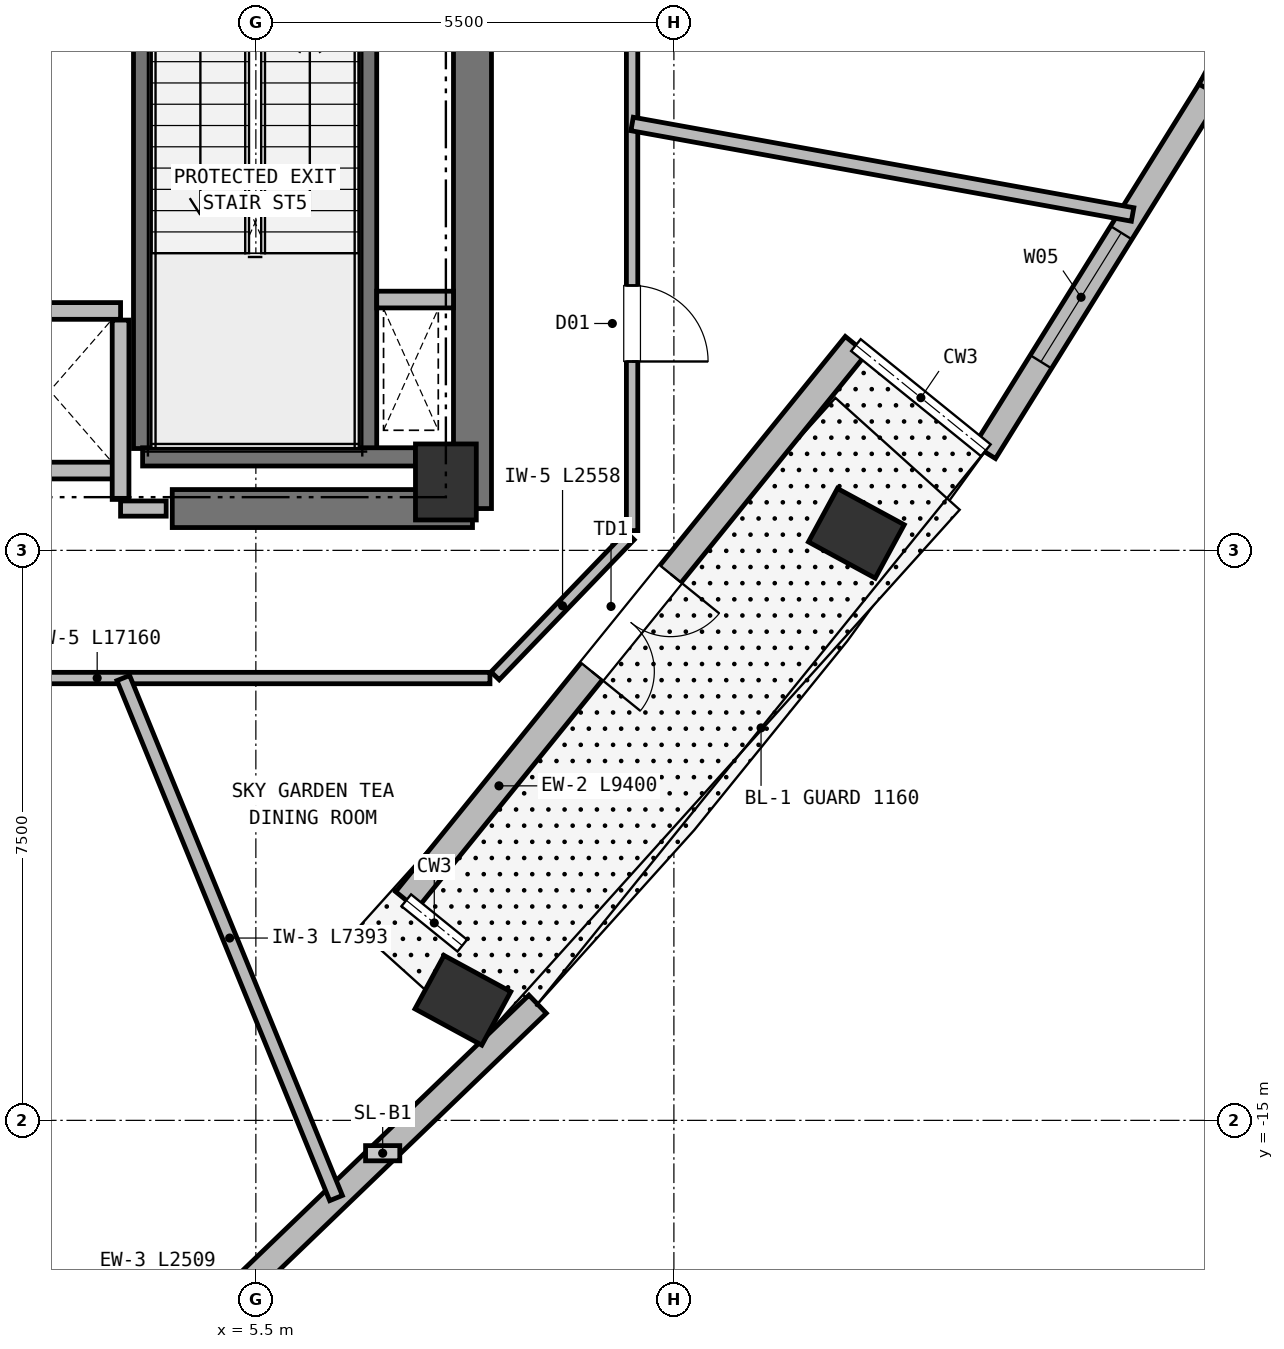
"""IFC4 building model, lengths in metres.
Left out: names, types, materials, properties, quantities, classifications, styles, units other than length and angle.
Written with IfcOpenShell. Run it as: python <this file> out.ifc"""

import sys

from ifc_helpers import new_model, si_unit, direction, frame, frame_2d, origin, origin_2d, place, context, subcontext, project, spatial, rectangle, extrude, element, fill, save


model = new_model("IFC4")
c1 = context("Model", 3, precision=1e-05, world=origin(), true_north=direction((0.0, 1.0)))
c2 = subcontext(c1, "Body", "Model", "MODEL_VIEW")
j1 = project(units=[si_unit("LENGTHUNIT", "METRE"), si_unit("PLANEANGLEUNIT", "RADIAN")], contexts=[c1])
p1 = place(None, origin())
s1 = spatial("IfcSite", under=j1, at=p1, CompositionType="ELEMENT")
p2 = place(p1, origin())
s2 = spatial("IfcBuilding", under=s1, at=p2, CompositionType="ELEMENT")
p3 = place(p2, frame((0.0, 0.0, 178.25)))
s3 = spatial("IfcBuildingStorey", under=s2, at=p3, CompositionType="ELEMENT", Elevation=178.25)
p4 = place(p3, frame((8.0, -6.6, 0.0), z_axis=(0.0, 0.0, 1.0), x_axis=(1.0, 0.0, 0.0)))
e1 = element("IfcColumn", 1, at=p4, inside=s3, PredefinedType="COLUMN", context=c2, shape_type="SweptSolid", body=[
    extrude(rectangle(XDim=0.8, YDim=1.0, at=origin_2d()), origin(), (0.0, 0.0, 1.0), 4.5),
])
p5 = place(p3, frame((4.4, -6.95, 0.0), z_axis=(0.0, 0.0, 1.0), x_axis=(1.0, 0.0, 0.0)))
e2 = element("IfcWall", 2, at=p5, inside=s3, PredefinedType="SHEAR", context=c2, shape_type="SweptSolid", body=[
    extrude(rectangle(XDim=3.95, YDim=0.5, at=frame_2d((1.975, 0.0))), origin(), (0.0, 0.0, 1.0), 4.25),
])
p6 = place(p3, frame((8.35, -6.95, 0.0), z_axis=(0.0, 0.0, 1.0), x_axis=(0.0, 1.0, 0.0)))
e3 = element("IfcWall", 3, at=p6, inside=s3, PredefinedType="SHEAR", context=c2, shape_type="SweptSolid", body=[
    extrude(rectangle(XDim=8.1, YDim=0.5, at=frame_2d((4.05, 0.0))), origin(), (0.0, 0.0, 1.0), 4.25),
])
for number, where, z_axis, x_axis in (
    (4, (8.224, -13.42, 0.0), (0.0, 0.0, 1.0), (0.477, 0.879, 0.0)),
    (5, (13.4, -7.276, 0.0), (0.0, 0.0, 1.0), (0.477, 0.879, 0.0)),
):
    element("IfcColumn", number, at=place(p3, frame(where, z_axis=z_axis, x_axis=x_axis)), inside=s3, PredefinedType="COLUMN", context=c2, shape_type="SweptSolid", body=[
        extrude(rectangle(XDim=0.8, YDim=1.0, at=origin_2d()), origin(), (0.0, 0.0, 1.0), 4.5),
    ])
p7 = place(p3, frame((13.395, -4.799, 0.0), z_axis=(0.0, 0.0, 1.0), x_axis=(-0.629314777839, -0.777150506912, 0.0)))
e6 = element("IfcWall", 6, at=p7, inside=s3, PredefinedType="SOLIDWALL", context=c2, shape_type="SweptSolid", body=[
    extrude(rectangle(XDim=9.4, YDim=0.36, at=frame_2d((4.7, 0.0))), origin(), (0.0, 0.0, 1.0), 3.93),
])
p8 = place(p7, frame((3.875, 0.0, 0.0)))
e7 = element("IfcOpeningElement", 7, at=p8, cuts=e6, PredefinedType="OPENING", context=c2, shape_type="SweptSolid", body=[
    extrude(rectangle(XDim=1.65, YDim=2.25, at=frame_2d((0.825, 1.125))), frame((0.0, 0.19, 0.0), z_axis=(0.0, -1.0, 0.0), x_axis=(1.0, 0.0, 0.0)), (0.0, 0.0, 1.0), 0.38),
])
p9 = place(p3, frame((9.207, -13.471, 0.0), z_axis=(0.0, 0.0, 1.0), x_axis=(-0.720698692284, -0.693248436667, 0.0)))
e8 = element("IfcWall", 8, at=p9, inside=s3, PredefinedType="SOLIDWALL", context=c2, shape_type="SweptSolid", body=[
    extrude(rectangle(XDim=5.656, YDim=0.33, at=frame_2d((2.828, 0.0))), origin(), (0.0, 0.0, 1.0), 4.25),
])
p10 = place(p3, frame((18.079, -1.402, 0.0), z_axis=(0.0, 0.0, 1.0), x_axis=(-0.528240348391, -0.849094891241, 0.0)))
e9 = element("IfcWall", 9, at=p10, inside=s3, PredefinedType="SOLIDWALL", context=c2, shape_type="SweptSolid", body=[
    extrude(rectangle(XDim=5.656, YDim=0.33, at=frame_2d((2.828, 0.0))), origin(), (0.0, 0.0, 1.0), 4.25),
])
p11 = place(p10, frame((2.26, 0.0, 0.72)))
e10 = element("IfcOpeningElement", 10, at=p11, cuts=e9, PredefinedType="OPENING", context=c2, shape_type="SweptSolid", body=[
    extrude(rectangle(XDim=2.0, YDim=2.15, at=frame_2d((1.0, 1.075))), frame((0.0, 0.175, 0.0), z_axis=(0.0, -1.0, 0.0), x_axis=(1.0, 0.0, 0.0)), (0.0, 0.0, 1.0), 0.35),
])
p12 = place(p3, frame((19.239, 0.767, 0.0), z_axis=(0.0, 0.0, 1.0), x_axis=(-0.472067478414, -0.881562417429, 0.0)))
e11 = element("IfcWall", 11, at=p12, inside=s3, PredefinedType="SOLIDWALL", context=c2, shape_type="SweptSolid", body=[
    extrude(rectangle(XDim=2.509, YDim=0.33, at=frame_2d((1.254, 0.0))), origin(), (0.0, 0.0, 1.0), 4.25),
])
p13 = place(p12, frame((0.279, 0.0, 0.72)))
e12 = element("IfcOpeningElement", 12, at=p13, cuts=e11, PredefinedType="OPENING", context=c2, shape_type="SweptSolid", body=[
    extrude(rectangle(XDim=1.95, YDim=2.15, at=frame_2d((0.975, 1.075))), frame((0.0, 0.175, 0.0), z_axis=(0.0, -1.0, 0.0), x_axis=(1.0, 0.0, 0.0)), (0.0, 0.0, 1.0), 0.35),
])
for number, where, z_axis, x_axis in (
    (13, (4.01, -6.16, 0.0), (0.0, 0.0, 1.0), (0.0, 1.0, 0.0)),
    (14, (6.97, -6.16, 0.0), (0.0, 0.0, 1.0), (0.0, 1.0, 0.0)),
):
    element("IfcWall", number, at=place(p3, frame(where, z_axis=z_axis, x_axis=x_axis)), inside=s3, PredefinedType="SHEAR", context=c2, shape_type="SweptSolid", body=[
        extrude(rectangle(XDim=7.22, YDim=0.24, at=frame_2d((3.61, 0.0))), origin(), (0.0, 0.0, 1.0), 4.25),
    ])
p14 = place(p3, frame((4.01, -6.27, 0.0), z_axis=(0.0, 0.0, 1.0), x_axis=(1.0, 0.0, 0.0)))
e15 = element("IfcWall", 15, at=p14, inside=s3, PredefinedType="SHEAR", context=c2, shape_type="SweptSolid", body=[
    extrude(rectangle(XDim=3.59, YDim=0.24, at=frame_2d((1.795, 0.0))), origin(), (0.0, 0.0, 1.0), 4.25),
])
p15 = place(p3, frame((7.09, -4.2, 0.0), z_axis=(0.0, 0.0, 1.0), x_axis=(1.0, 0.0, 0.0)))
e16 = element("IfcWall", 16, at=p15, inside=s3, PredefinedType="PARTITIONING", context=c2, shape_type="SweptSolid", body=[
    extrude(rectangle(XDim=1.01, YDim=0.22, at=frame_2d((0.505, 0.0))), origin(), (0.0, 0.0, 1.0), 4.25),
])
p16 = place(p3, frame((1.86, -6.45, 0.0), z_axis=(0.0, 0.0, 1.0), x_axis=(1.0, 0.0, 0.0)))
e17 = element("IfcWall", 17, at=p16, inside=s3, PredefinedType="PARTITIONING", context=c2, shape_type="SweptSolid", body=[
    extrude(rectangle(XDim=1.86, YDim=0.22, at=frame_2d((0.93, 0.0))), origin(), (0.0, 0.0, 1.0), 3.88),
])
p17 = place(p3, frame((1.86, -4.35, 0.0), z_axis=(0.0, 0.0, 1.0), x_axis=(1.0, 0.0, 0.0)))
e18 = element("IfcWall", 18, at=p17, inside=s3, PredefinedType="PARTITIONING", context=c2, shape_type="SweptSolid", body=[
    extrude(rectangle(XDim=1.86, YDim=0.22, at=frame_2d((0.93, 0.0))), origin(), (0.0, 0.0, 1.0), 4.25),
])
p18 = place(p3, frame((3.72, -6.83, 0.0), z_axis=(0.0, 0.0, 1.0), x_axis=(0.0, 1.0, 0.0)))
e19 = element("IfcWall", 19, at=p18, inside=s3, PredefinedType="PARTITIONING", context=c2, shape_type="SweptSolid", body=[
    extrude(rectangle(XDim=2.36, YDim=0.22, at=frame_2d((1.18, 0.0))), origin(), (0.0, 0.0, 1.0), 4.25),
])
p19 = place(p3, frame((3.72, -6.95, 0.0), z_axis=(0.0, 0.0, 1.0), x_axis=(1.0, 0.0, 0.0)))
e20 = element("IfcWall", 20, at=p19, inside=s3, PredefinedType="PARTITIONING", context=c2, shape_type="SweptSolid", body=[
    extrude(rectangle(XDim=0.6, YDim=0.2, at=frame_2d((0.3, 0.0))), origin(), (0.0, 0.0, 1.0), 4.25),
])
p20 = place(p3, frame((8.58, -9.18, 0.0), z_axis=(0.0, 0.0, 1.0), x_axis=(-1.0, 0.0, 0.0)))
e21 = element("IfcWall", 21, at=p20, inside=s3, PredefinedType="PARTITIONING", context=c2, shape_type="SweptSolid", body=[
    extrude(rectangle(XDim=17.16, YDim=0.15, at=frame_2d((8.58, 0.0))), origin(), (0.0, 0.0, 1.0), 3.93),
])
p21 = place(p20, frame((10.436, 0.0, 0.0)))
e22 = element("IfcOpeningElement", 22, at=p21, cuts=e21, PredefinedType="OPENING", context=c2, shape_type="SweptSolid", body=[
    extrude(rectangle(XDim=1.0, YDim=2.15, at=frame_2d((0.5, 1.075))), frame((0.0, 0.085, 0.0), z_axis=(0.0, -1.0, 0.0), x_axis=(1.0, 0.0, 0.0)), (0.0, 0.0, 1.0), 0.17),
])
p22 = place(p3, frame((10.422, -7.309, 0.0), z_axis=(0.0, 0.0, 1.0), x_axis=(-0.693764562202, -0.720201869085, 0.0)))
e23 = element("IfcWall", 23, at=p22, inside=s3, PredefinedType="PARTITIONING", context=c2, shape_type="SweptSolid", body=[
    extrude(rectangle(XDim=2.558, YDim=0.15, at=frame_2d((1.279, 0.0))), origin(), (0.0, 0.0, 1.0), 3.93),
])
p23 = place(p3, frame((10.45, 7.24, 0.0), z_axis=(0.0, 0.0, 1.0), x_axis=(0.0, -1.0, 0.0)))
e24 = element("IfcWall", 24, at=p23, inside=s3, PredefinedType="PARTITIONING", context=c2, shape_type="SweptSolid", body=[
    extrude(rectangle(XDim=14.48, YDim=0.15, at=frame_2d((7.24, 0.0))), origin(), (0.0, 0.0, 1.0), 4.25),
])
p24 = place(p23, frame((11.255, 0.0, 0.0)))
e25 = element("IfcOpeningElement", 25, at=p24, cuts=e24, PredefinedType="OPENING", context=c2, shape_type="SweptSolid", body=[
    extrude(rectangle(XDim=1.0, YDim=2.15, at=frame_2d((0.5, 1.075))), frame((0.0, 0.085, 0.0), z_axis=(0.0, -1.0, 0.0), x_axis=(1.0, 0.0, 0.0)), (0.0, 0.0, 1.0), 0.17),
])
p25 = place(p23, frame((4.206, 0.0, 0.0)))
e26 = element("IfcOpeningElement", 26, at=p25, cuts=e24, PredefinedType="OPENING", context=c2, shape_type="SweptSolid", body=[
    extrude(rectangle(XDim=1.0, YDim=2.15, at=frame_2d((0.5, 1.075))), frame((0.0, 0.085, 0.0), z_axis=(0.0, -1.0, 0.0), x_axis=(1.0, 0.0, 0.0)), (0.0, 0.0, 1.0), 0.17),
])
p26 = place(p3, frame((3.756, -9.18, 0.0), z_axis=(0.0, 0.0, 1.0), x_axis=(0.378655991799, -0.925537487018, 0.0)))
e27 = element("IfcWall", 27, at=p26, inside=s3, PredefinedType="PARTITIONING", context=c2, shape_type="SweptSolid", body=[
    extrude(rectangle(XDim=7.393, YDim=0.18, at=frame_2d((3.696, 0.0))), origin(), (0.0, 0.0, 1.0), 4.25),
])
p27 = place(p3, frame((10.45, -1.89, 0.0), z_axis=(0.0, 0.0, 1.0), x_axis=(0.984042819354, -0.177931811879, 0.0)))
e28 = element("IfcWall", 28, at=p27, inside=s3, PredefinedType="PARTITIONING", context=c2, shape_type="SweptSolid", body=[
    extrude(rectangle(XDim=6.692, YDim=0.18, at=frame_2d((3.346, 0.0))), origin(), (0.0, 0.0, 1.0), 4.25),
])
p28 = place(p8, origin())
e29 = element("IfcDoor", 29, at=p28, inside=s3, OperationType="DOUBLE_DOOR_SINGLE_SWING", PredefinedType="DOOR", context=c2, shape_type="SweptSolid", body=[
    extrude(rectangle(XDim=1.65, YDim=2.25, at=frame_2d((0.825, 1.125))), frame((0.0, 0.025, 0.0), z_axis=(0.0, -1.0, 0.0), x_axis=(1.0, 0.0, 0.0)), (0.0, 0.0, 1.0), 0.05),
])
fill(e7, e29)
p29 = place(p11, origin())
e30 = element("IfcWindow", 30, at=p29, inside=s3, PartitioningType="SINGLE_PANEL", PredefinedType="WINDOW", context=c2, shape_type="SweptSolid", body=[
    extrude(rectangle(XDim=2.0, YDim=2.15, at=frame_2d((1.0, 1.075))), frame((0.0, 0.03, 0.0), z_axis=(0.0, -1.0, 0.0), x_axis=(1.0, 0.0, 0.0)), (0.0, 0.0, 1.0), 0.06),
])
fill(e10, e30)
p30 = place(p24, origin())
e31 = element("IfcDoor", 31, at=p30, inside=s3, OperationType="SINGLE_SWING_RIGHT", PredefinedType="DOOR", context=c2, shape_type="SweptSolid", body=[
    extrude(rectangle(XDim=1.0, YDim=2.15, at=frame_2d((0.5, 1.075))), frame((0.0, 0.025, 0.0), z_axis=(0.0, -1.0, 0.0), x_axis=(1.0, 0.0, 0.0)), (0.0, 0.0, 1.0), 0.05),
])
fill(e25, e31)
save(model, sys.argv[1])
